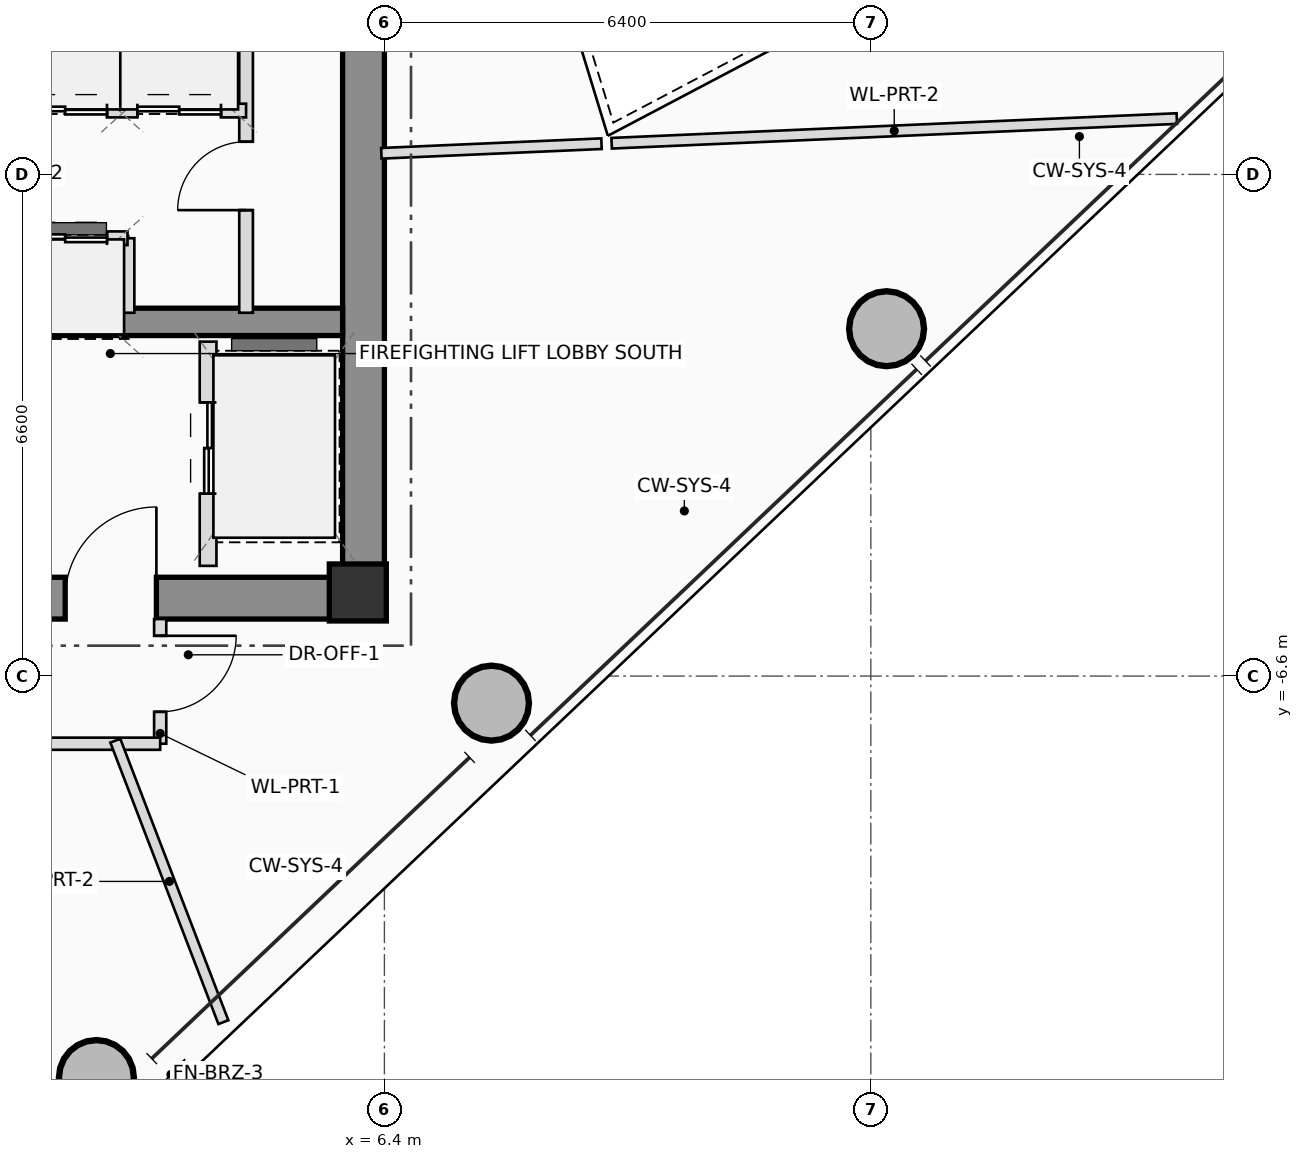
"""IFC4 building model, lengths in metres.
Left out: names, types, materials, properties, quantities, classifications, styles, units other than length and angle.
Written with IfcOpenShell. Run it as: python <this file> out.ifc"""

import sys

from ifc_helpers import new_model, si_unit, direction, frame, frame_2d, origin, origin_2d, place, context, subcontext, project, spatial, rectangle, hollow_circle, extrude, source, transform, mapped, element, fill, save


model = new_model("IFC4")
c1 = context("Model", 3, precision=1e-05, world=origin(), true_north=direction((0.0, 1.0)))
c2 = subcontext(c1, "Body", "Model", "MODEL_VIEW")
j1 = project(units=[si_unit("LENGTHUNIT", "METRE"), si_unit("PLANEANGLEUNIT", "RADIAN")], contexts=[c1])
p1 = place(None, origin())
s1 = spatial("IfcSite", under=j1, at=p1, CompositionType="ELEMENT")
p2 = place(p1, origin())
s2 = spatial("IfcBuilding", under=s1, at=p2, CompositionType="ELEMENT")
p3 = place(p2, frame((0.0, 0.0, 242.25)))
s3 = spatial("IfcBuildingStorey", under=s2, at=p3, CompositionType="ELEMENT", Elevation=242.25)
m1 = source(origin(), c2, "Body", "SweptSolid", [
    extrude(rectangle(XDim=0.75, YDim=0.75, at=origin_2d()), origin(), (0.0, 0.0, 1.0), 3.4),
])
p4 = place(p3, frame((6.05, -5.5, 0.0), z_axis=(0.0, 0.0, 1.0), x_axis=(1.0, 0.0, 0.0)))
e1 = element("IfcColumn", 1, at=p4, inside=s3, PredefinedType="COLUMN", context=c2, shape_type="MappedRepresentation", body=[
    mapped(m1, transform((0.0, 0.0, 0.0), scale=1.0)),
])
p5 = place(p3, frame((-6.4, -5.575, 0.0), z_axis=(0.0, 0.0, 1.0), x_axis=(1.0, 0.0, 0.0)))
e2 = element("IfcWall", 2, at=p5, inside=s3, PredefinedType="SHEAR", context=c2, shape_type="SweptSolid", body=[
    extrude(rectangle(XDim=12.8, YDim=0.55, at=frame_2d((6.4, 0.0))), origin(), (0.0, 0.0, 1.0), 3.4),
])
p6 = place(p5, frame((8.6, 0.0, 0.0)))
e3 = element("IfcOpeningElement", 3, at=p6, cuts=e2, PredefinedType="OPENING", context=c2, shape_type="SweptSolid", body=[
    extrude(rectangle(XDim=1.2, YDim=2.2, at=frame_2d((0.6, 1.1))), frame((0.0, 0.285, 0.0), z_axis=(0.0, -1.0, 0.0), x_axis=(1.0, 0.0, 0.0)), (0.0, 0.0, 1.0), 0.57),
])
p7 = place(p3, frame((6.125, -5.3, 0.0), z_axis=(0.0, 0.0, 1.0), x_axis=(0.0, 1.0, 0.0)))
e4 = element("IfcWall", 4, at=p7, inside=s3, PredefinedType="SHEAR", context=c2, shape_type="SweptSolid", body=[
    extrude(rectangle(XDim=10.6, YDim=0.55, at=frame_2d((5.3, 0.0))), origin(), (0.0, 0.0, 1.0), 3.4),
])
p8 = place(p3, frame((-5.85, -1.94, 0.0), z_axis=(0.0, 0.0, 1.0), x_axis=(1.0, 0.0, 0.0)))
e5 = element("IfcWall", 5, at=p8, inside=s3, PredefinedType="SHEAR", context=c2, shape_type="SweptSolid", body=[
    extrude(rectangle(XDim=11.7, YDim=0.36, at=frame_2d((5.85, 0.0))), origin(), (0.0, 0.0, 1.0), 3.4),
])
m2 = source(origin(), c2, "Body", "SweptSolid", [
    extrude(hollow_circle(Radius=0.5, WallThickness=0.04, at=origin_2d()), origin(), (0.0, 0.0, 1.0), 3.4),
])
for number, where, z_axis, x_axis in (
    (6, (2.611, -11.882, 0.0), (0.0, 0.0, 1.0), (1.0, 0.0, 0.0)),
    (7, (7.809, -6.956, 0.0), (0.0, 0.0, 1.0), (1.0, 0.0, 0.0)),
    (8, (13.007, -2.03, 0.0), (0.0, 0.0, 1.0), (1.0, 0.0, 0.0)),
):
    element("IfcColumn", number, at=place(p3, frame(where, z_axis=z_axis, x_axis=x_axis)), inside=s3, PredefinedType="COLUMN", context=c2, shape_type="MappedRepresentation", body=[
        mapped(m2, transform((0.0, 0.0, 0.0), scale=1.0)),
    ])
p9 = place(p3, frame((4.08, -5.15, 0.0), z_axis=(0.0, 0.0, 1.0), x_axis=(0.0, 1.0, 0.0)))
e9 = element("IfcWall", 9, at=p9, inside=s3, PredefinedType="PLUMBINGWALL", context=c2, shape_type="SweptSolid", body=[
    extrude(rectangle(XDim=2.95, YDim=0.22, at=frame_2d((1.475, 0.0))), origin(), (0.0, 0.0, 1.0), 3.2),
])
p10 = place(p9, frame((0.95, 0.0, 0.0)))
e10 = element("IfcOpeningElement", 10, at=p10, cuts=e9, PredefinedType="OPENING", context=c2, shape_type="SweptSolid", body=[
    extrude(rectangle(XDim=1.2, YDim=2.25, at=frame_2d((0.6, 1.125))), frame((0.0, 0.12, 0.0), z_axis=(0.0, -1.0, 0.0), x_axis=(1.0, 0.0, 0.0)), (0.0, 0.0, 1.0), 0.24),
])
for number, where, z_axis, x_axis in (
    (11, (3.02, 0.84, 0.0), (0.0, 0.0, 1.0), (0.0, 1.0, 0.0)),
    (12, (4.38, 0.84, 0.0), (0.0, 0.0, 1.0), (0.0, 1.0, 0.0)),
    (13, (3.02, -1.82, 0.0), (0.0, 0.0, 1.0), (0.0, 1.0, 0.0)),
):
    element("IfcWall", number, at=place(p3, frame(where, z_axis=z_axis, x_axis=x_axis)), inside=s3, PredefinedType="PLUMBINGWALL", context=c2, shape_type="SweptSolid", body=[
        extrude(rectangle(XDim=0.98, YDim=0.18, at=frame_2d((0.49, 0.0))), origin(), (0.0, 0.0, 1.0), 3.2),
    ])
p11 = place(p3, frame((4.58, -1.82, 0.0), z_axis=(0.0, 0.0, 1.0), x_axis=(0.0, 1.0, 0.0)))
e14 = element("IfcWall", 14, at=p11, inside=s3, PredefinedType="PLUMBINGWALL", context=c2, shape_type="SweptSolid", body=[
    extrude(rectangle(XDim=3.64, YDim=0.18, at=frame_2d((1.82, 0.0))), origin(), (0.0, 0.0, 1.0), 3.2),
])
p12 = place(p11, frame((1.35, 0.0, 0.0)))
e15 = element("IfcOpeningElement", 15, at=p12, cuts=e14, PredefinedType="OPENING", context=c2, shape_type="SweptSolid", body=[
    extrude(rectangle(XDim=0.9, YDim=2.05, at=frame_2d((0.45, 1.025))), frame((0.0, 0.1, 0.0), z_axis=(0.0, -1.0, 0.0), x_axis=(1.0, 0.0, 0.0)), (0.0, 0.0, 1.0), 0.2),
])
p13 = place(p3, frame((-5.68, 0.84, 0.0), z_axis=(0.0, 0.0, 1.0), x_axis=(1.0, 0.0, 0.0)))
e16 = element("IfcWall", 16, at=p13, inside=s3, PredefinedType="PLUMBINGWALL", context=c2, shape_type="SweptSolid", body=[
    extrude(rectangle(XDim=10.26, YDim=0.18, at=frame_2d((5.13, 0.0))), origin(), (0.0, 0.0, 1.0), 3.2),
])
p14 = place(p13, frame((0.91, 0.0, 0.0)))
e17 = element("IfcOpeningElement", 17, at=p14, cuts=e16, PredefinedType="OPENING", context=c2, shape_type="SweptSolid", body=[
    extrude(rectangle(XDim=0.9, YDim=2.05, at=frame_2d((0.45, 1.025))), frame((0.0, 0.1, 0.0), z_axis=(0.0, -1.0, 0.0), x_axis=(1.0, 0.0, 0.0)), (0.0, 0.0, 1.0), 0.2),
])
p15 = place(p13, frame((4.38, 0.0, 0.0)))
e18 = element("IfcOpeningElement", 18, at=p15, cuts=e16, PredefinedType="OPENING", context=c2, shape_type="SweptSolid", body=[
    extrude(rectangle(XDim=0.9, YDim=2.05, at=frame_2d((0.45, 1.025))), frame((0.0, 0.1, 0.0), z_axis=(0.0, -1.0, 0.0), x_axis=(1.0, 0.0, 0.0)), (0.0, 0.0, 1.0), 0.2),
])
p16 = place(p13, frame((7.33, 0.0, 0.0)))
e19 = element("IfcOpeningElement", 19, at=p16, cuts=e16, PredefinedType="OPENING", context=c2, shape_type="SweptSolid", body=[
    extrude(rectangle(XDim=1.1, YDim=2.2, at=frame_2d((0.55, 1.1))), frame((0.0, 0.1, 0.0), z_axis=(0.0, -1.0, 0.0), x_axis=(1.0, 0.0, 0.0)), (0.0, 0.0, 1.0), 0.2),
])
p17 = place(p13, frame((8.83, 0.0, 0.0)))
e20 = element("IfcOpeningElement", 20, at=p17, cuts=e16, PredefinedType="OPENING", context=c2, shape_type="SweptSolid", body=[
    extrude(rectangle(XDim=1.1, YDim=2.2, at=frame_2d((0.55, 1.1))), frame((0.0, 0.1, 0.0), z_axis=(0.0, -1.0, 0.0), x_axis=(1.0, 0.0, 0.0)), (0.0, 0.0, 1.0), 0.2),
])
p18 = place(p3, frame((-5.68, -0.84, 0.0), z_axis=(0.0, 0.0, 1.0), x_axis=(1.0, 0.0, 0.0)))
e21 = element("IfcWall", 21, at=p18, inside=s3, PredefinedType="PLUMBINGWALL", context=c2, shape_type="SweptSolid", body=[
    extrude(rectangle(XDim=8.7, YDim=0.18, at=frame_2d((4.35, 0.0))), origin(), (0.0, 0.0, 1.0), 3.2),
])
p19 = place(p18, frame((3.13, 0.0, 0.0)))
e22 = element("IfcOpeningElement", 22, at=p19, cuts=e21, PredefinedType="OPENING", context=c2, shape_type="SweptSolid", body=[
    extrude(rectangle(XDim=0.9, YDim=2.05, at=frame_2d((0.45, 1.025))), frame((0.0, 0.1, 0.0), z_axis=(0.0, -1.0, 0.0), x_axis=(1.0, 0.0, 0.0)), (0.0, 0.0, 1.0), 0.2),
])
p20 = place(p18, frame((7.33, 0.0, 0.0)))
e23 = element("IfcOpeningElement", 23, at=p20, cuts=e21, PredefinedType="OPENING", context=c2, shape_type="SweptSolid", body=[
    extrude(rectangle(XDim=1.1, YDim=2.2, at=frame_2d((0.55, 1.1))), frame((0.0, 0.1, 0.0), z_axis=(0.0, -1.0, 0.0), x_axis=(1.0, 0.0, 0.0)), (0.0, 0.0, 1.0), 0.2),
])
p21 = place(p3, frame((3.45, -5.85, 0.0), z_axis=(0.0, 0.0, 1.0), x_axis=(0.0, -1.0, 0.0)))
e24 = element("IfcWall", 24, at=p21, inside=s3, PredefinedType="PARTITIONING", context=c2, shape_type="SweptSolid", body=[
    extrude(rectangle(XDim=1.64, YDim=0.16, at=frame_2d((0.82, 0.0))), origin(), (0.0, 0.0, 1.0), 3.2),
])
p22 = place(p21, frame((0.22, 0.0, 0.0)))
e25 = element("IfcOpeningElement", 25, at=p22, cuts=e24, PredefinedType="OPENING", context=c2, shape_type="SweptSolid", body=[
    extrude(rectangle(XDim=1.0, YDim=2.25, at=frame_2d((0.5, 1.125))), frame((0.0, 0.09, 0.0), z_axis=(0.0, -1.0, 0.0), x_axis=(1.0, 0.0, 0.0)), (0.0, 0.0, 1.0), 0.18),
])
p23 = place(p3, frame((3.45, -7.49, 0.0), z_axis=(0.0, 0.0, 1.0), x_axis=(-1.0, 0.0, 0.0)))
e26 = element("IfcWall", 26, at=p23, inside=s3, PredefinedType="PARTITIONING", context=c2, shape_type="SweptSolid", body=[
    extrude(rectangle(XDim=9.81, YDim=0.16, at=frame_2d((4.905, 0.0))), origin(), (0.0, 0.0, 1.0), 2.605),
])
p24 = place(p23, frame((2.482, 0.0, 0.0)))
e27 = element("IfcOpeningElement", 27, at=p24, cuts=e26, PredefinedType="OPENING", context=c2, shape_type="SweptSolid", body=[
    extrude(rectangle(XDim=1.0, YDim=2.25, at=frame_2d((0.5, 1.125))), frame((0.0, 0.09, 0.0), z_axis=(0.0, -1.0, 0.0), x_axis=(1.0, 0.0, 0.0)), (0.0, 0.0, 1.0), 0.18),
])
p25 = place(p23, frame((7.021, 0.0, 0.0)))
e28 = element("IfcOpeningElement", 28, at=p25, cuts=e26, PredefinedType="OPENING", context=c2, shape_type="SweptSolid", body=[
    extrude(rectangle(XDim=1.0, YDim=2.25, at=frame_2d((0.5, 1.125))), frame((0.0, 0.09, 0.0), z_axis=(0.0, -1.0, 0.0), x_axis=(1.0, 0.0, 0.0)), (0.0, 0.0, 1.0), 0.18),
])
p26 = place(p3, frame((6.36, 0.278, 0.0), z_axis=(0.0, 0.0, 1.0), x_axis=(0.999048037217, 0.043623609819, 0.0)))
e29 = element("IfcWall", 29, at=p26, inside=s3, PredefinedType="PARTITIONING", context=c2, shape_type="SweptSolid", body=[
    extrude(rectangle(XDim=2.899, YDim=0.14, at=frame_2d((1.449, 0.0))), origin(), (0.0, 0.0, 1.0), 3.2),
])
p27 = place(p3, frame((9.39, 0.41, 0.0), z_axis=(0.0, 0.0, 1.0), x_axis=(0.999047971421, 0.043625116619, 0.0)))
e30 = element("IfcWall", 30, at=p27, inside=s3, PredefinedType="PARTITIONING", context=c2, shape_type="SweptSolid", body=[
    extrude(rectangle(XDim=7.443, YDim=0.14, at=frame_2d((3.722, 0.0))), origin(), (0.0, 0.0, 1.0), 2.605),
])
p28 = place(p3, frame((2.86, -7.45, 0.0), z_axis=(0.0, 0.0, 1.0), x_axis=(0.35834382605, -0.933589686282, 0.0)))
e31 = element("IfcWall", 31, at=p28, inside=s3, PredefinedType="PARTITIONING", context=c2, shape_type="SweptSolid", body=[
    extrude(rectangle(XDim=3.967, YDim=0.14, at=frame_2d((1.983, 0.0))), origin(), (0.0, 0.0, 1.0), 2.605),
])
p29 = place(p6, origin())
e32 = element("IfcDoor", 32, at=p29, inside=s3, OperationType="SINGLE_SWING_RIGHT", PredefinedType="DOOR", context=c2, shape_type="SweptSolid", body=[
    extrude(rectangle(XDim=1.2, YDim=2.2, at=frame_2d((0.6, 1.1))), frame((0.0, 0.025, 0.0), z_axis=(0.0, -1.0, 0.0), x_axis=(1.0, 0.0, 0.0)), (0.0, 0.0, 1.0), 0.05),
])
fill(e3, e32)
p30 = place(p10, origin())
e33 = element("IfcDoor", 33, at=p30, inside=s3, OperationType="DOUBLE_DOOR_SLIDING", PredefinedType="DOOR", context=c2, shape_type="SweptSolid", body=[
    extrude(rectangle(XDim=1.2, YDim=2.25, at=frame_2d((0.6, 1.125))), frame((0.0, 0.025, 0.0), z_axis=(0.0, -1.0, 0.0), x_axis=(1.0, 0.0, 0.0)), (0.0, 0.0, 1.0), 0.05),
])
fill(e10, e33)
p31 = place(p12, origin())
e34 = element("IfcDoor", 34, at=p31, inside=s3, OperationType="SINGLE_SWING_LEFT", PredefinedType="DOOR", context=c2, shape_type="SweptSolid", body=[
    extrude(rectangle(XDim=0.9, YDim=2.05, at=frame_2d((0.45, 1.025))), frame((0.0, 0.025, 0.0), z_axis=(0.0, -1.0, 0.0), x_axis=(1.0, 0.0, 0.0)), (0.0, 0.0, 1.0), 0.05),
])
fill(e15, e34)
p32 = place(p16, origin())
e35 = element("IfcDoor", 35, at=p32, inside=s3, OperationType="DOUBLE_DOOR_SLIDING", PredefinedType="DOOR", context=c2, shape_type="SweptSolid", body=[
    extrude(rectangle(XDim=1.1, YDim=2.2, at=frame_2d((0.55, 1.1))), frame((0.0, 0.025, 0.0), z_axis=(0.0, -1.0, 0.0), x_axis=(1.0, 0.0, 0.0)), (0.0, 0.0, 1.0), 0.05),
])
fill(e19, e35)
p33 = place(p17, origin())
e36 = element("IfcDoor", 36, at=p33, inside=s3, OperationType="DOUBLE_DOOR_SLIDING", PredefinedType="DOOR", context=c2, shape_type="SweptSolid", body=[
    extrude(rectangle(XDim=1.1, YDim=2.2, at=frame_2d((0.55, 1.1))), frame((0.0, 0.025, 0.0), z_axis=(0.0, -1.0, 0.0), x_axis=(1.0, 0.0, 0.0)), (0.0, 0.0, 1.0), 0.05),
])
fill(e20, e36)
p34 = place(p20, origin())
e37 = element("IfcDoor", 37, at=p34, inside=s3, OperationType="DOUBLE_DOOR_SLIDING", PredefinedType="DOOR", context=c2, shape_type="SweptSolid", body=[
    extrude(rectangle(XDim=1.1, YDim=2.2, at=frame_2d((0.55, 1.1))), frame((0.0, 0.025, 0.0), z_axis=(0.0, -1.0, 0.0), x_axis=(1.0, 0.0, 0.0)), (0.0, 0.0, 1.0), 0.05),
])
fill(e23, e37)
p35 = place(p22, origin())
e38 = element("IfcDoor", 38, at=p35, inside=s3, OperationType="SINGLE_SWING_LEFT", PredefinedType="DOOR", context=c2, shape_type="SweptSolid", body=[
    extrude(rectangle(XDim=1.0, YDim=2.25, at=frame_2d((0.5, 1.125))), frame((0.0, 0.025, 0.0), z_axis=(0.0, -1.0, 0.0), x_axis=(1.0, 0.0, 0.0)), (0.0, 0.0, 1.0), 0.05),
])
fill(e25, e38)
save(model, sys.argv[1])
